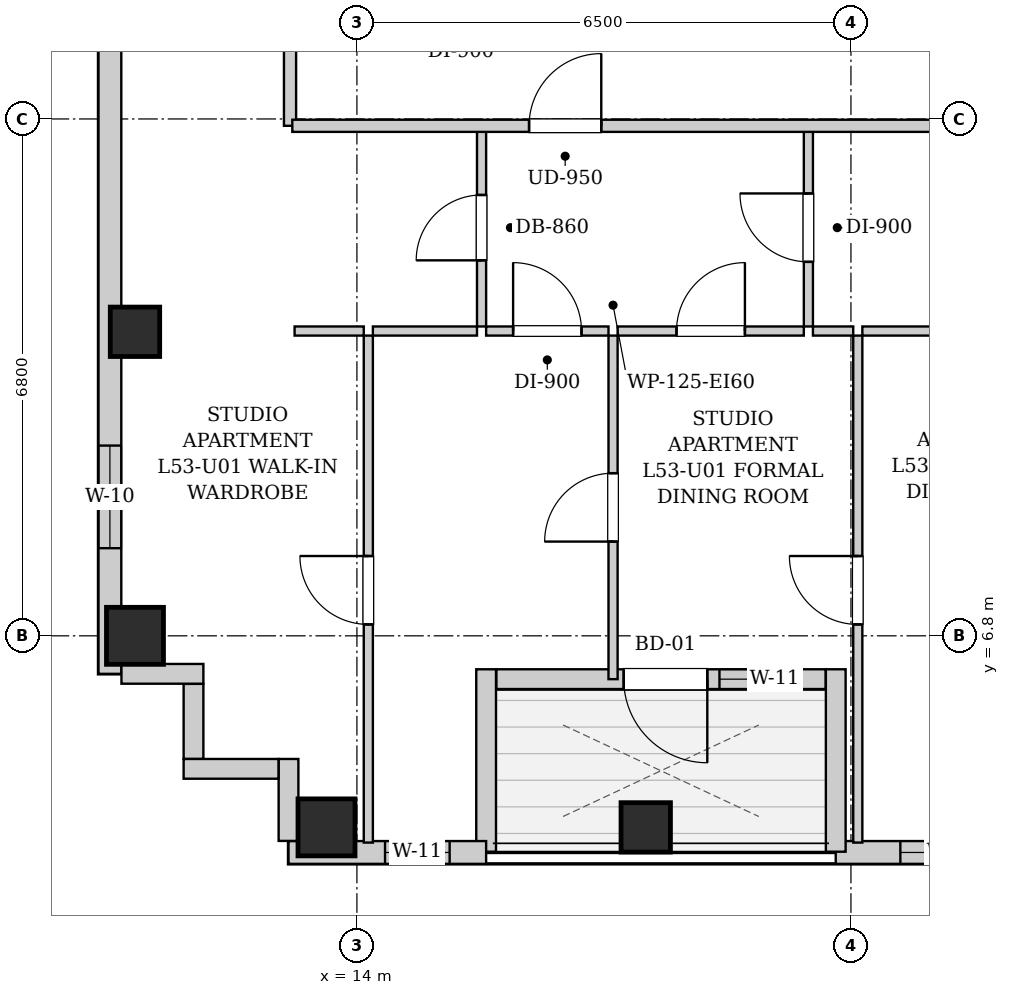
"""IFC4 building model, lengths in metres.
Left out: names, types, materials, properties, quantities, classifications, styles, units other than length and angle.
Written with IfcOpenShell. Run it as: python <this file> out.ifc"""

import sys

from ifc_helpers import new_model, si_unit, direction, frame, frame_2d, origin, origin_2d, place, context, subcontext, project, spatial, rectangle, extrude, element, fill, save


model = new_model("IFC4")
c1 = context("Model", 3, precision=1e-05, world=origin(), true_north=direction((0.0, 1.0)))
c2 = subcontext(c1, "Body", "Model", "MODEL_VIEW")
j1 = project(units=[si_unit("LENGTHUNIT", "METRE"), si_unit("PLANEANGLEUNIT", "RADIAN")], contexts=[c1])
p1 = place(None, origin())
s1 = spatial("IfcSite", under=j1, at=p1, CompositionType="ELEMENT")
p2 = place(p1, origin())
s2 = spatial("IfcBuilding", under=s1, at=p2, CompositionType="ELEMENT")
p3 = place(p2, frame((0.0, 0.0, 184.3)))
s3 = spatial("IfcBuildingStorey", under=s2, at=p3, CompositionType="ELEMENT", Elevation=184.3)
p4 = place(p3, frame((13.6, 4.28, 0.0), z_axis=(0.0, 0.0, 1.0), x_axis=(1.0, 0.0, 0.0)))
e1 = element("IfcColumn", 1, at=p4, inside=s3, PredefinedType="COLUMN", context=c2, shape_type="SweptSolid", body=[
    extrude(rectangle(XDim=0.75, YDim=0.75, at=origin_2d()), origin(), (0.0, 0.0, 1.0), 3.3),
])
p5 = place(p3, frame((17.8, 4.28, 0.0), z_axis=(0.0, 0.0, 1.0), x_axis=(1.0, 0.0, 0.0)))
e2 = element("IfcColumn", 2, at=p5, inside=s3, PredefinedType="COLUMN", context=c2, shape_type="SweptSolid", body=[
    extrude(rectangle(XDim=0.65, YDim=0.65, at=origin_2d()), origin(), (0.0, 0.0, 1.0), 3.3),
])
p6 = place(p3, frame((11.08, 6.8, 0.0), z_axis=(0.0, 0.0, 1.0), x_axis=(1.0, 0.0, 0.0)))
e3 = element("IfcColumn", 3, at=p6, inside=s3, PredefinedType="COLUMN", context=c2, shape_type="SweptSolid", body=[
    extrude(rectangle(XDim=0.75, YDim=0.75, at=origin_2d()), origin(), (0.0, 0.0, 1.0), 3.3),
])
p7 = place(p3, frame((11.08, 10.8, 0.0), z_axis=(0.0, 0.0, 1.0), x_axis=(1.0, 0.0, 0.0)))
e4 = element("IfcColumn", 4, at=p7, inside=s3, PredefinedType="COLUMN", context=c2, shape_type="SweptSolid", body=[
    extrude(rectangle(XDim=0.65, YDim=0.65, at=origin_2d()), origin(), (0.0, 0.0, 1.0), 3.3),
])
p8 = place(p3, frame((31.5, 3.95, 0.0), z_axis=(0.0, 0.0, 1.0), x_axis=(-1.0, 0.0, 0.0)))
e5 = element("IfcWall", 5, at=p8, inside=s3, PredefinedType="SOLIDWALL", context=c2, shape_type="SweptSolid", body=[
    extrude(rectangle(XDim=11.2, YDim=0.3, at=frame_2d((5.6, 0.0))), origin(), (0.0, 0.0, 1.0), 3.04),
])
p9 = place(p8, frame((9.0, 0.0, 0.55)))
e6 = element("IfcOpeningElement", 6, at=p9, cuts=e5, PredefinedType="OPENING", context=c2, shape_type="SweptSolid", body=[
    extrude(rectangle(XDim=1.35, YDim=1.2, at=frame_2d((0.675, 0.6))), frame((0.0, 0.16, 0.0), z_axis=(0.0, -1.0, 0.0), x_axis=(1.0, 0.0, 0.0)), (0.0, 0.0, 1.0), 0.32),
])
p10 = place(p8, frame((2.201, 0.0, 0.55)))
e7 = element("IfcOpeningElement", 7, at=p10, cuts=e5, PredefinedType="OPENING", context=c2, shape_type="SweptSolid", body=[
    extrude(rectangle(XDim=1.35, YDim=1.2, at=frame_2d((0.675, 0.6))), frame((0.0, 0.16, 0.0), z_axis=(0.0, -1.0, 0.0), x_axis=(1.0, 0.0, 0.0)), (0.0, 0.0, 1.0), 0.32),
])
p11 = place(p8, frame((0.35, 0.0, 0.55)))
e8 = element("IfcOpeningElement", 8, at=p11, cuts=e5, PredefinedType="OPENING", context=c2, shape_type="SweptSolid", body=[
    extrude(rectangle(XDim=0.68, YDim=1.2, at=frame_2d((0.34, 0.6))), frame((0.0, 0.16, 0.0), z_axis=(0.0, -1.0, 0.0), x_axis=(1.0, 0.0, 0.0)), (0.0, 0.0, 1.0), 0.32),
])
p12 = place(p3, frame((20.3, 3.96, 0.0), z_axis=(0.0, 0.0, 1.0), x_axis=(0.0, 1.0, 0.0)))
e9 = element("IfcWall", 9, at=p12, inside=s3, PredefinedType="SOLIDWALL", context=c2, shape_type="SweptSolid", body=[
    extrude(rectangle(XDim=2.4, YDim=0.26, at=frame_2d((1.2, 0.0))), origin(), (0.0, 0.0, 1.0), 3.04),
])
p13 = place(p3, frame((20.166, 6.23, 0.0), z_axis=(0.0, 0.0, 1.0), x_axis=(-1.0, 0.0, 0.0)))
e10 = element("IfcWall", 10, at=p13, inside=s3, PredefinedType="SOLIDWALL", context=c2, shape_type="SweptSolid", body=[
    extrude(rectangle(XDim=4.332, YDim=0.26, at=frame_2d((2.166, 0.0))), origin(), (0.0, 0.0, 1.0), 3.04),
])
p14 = place(p13, frame((1.556, 0.0, 0.0)))
e11 = element("IfcOpeningElement", 11, at=p14, cuts=e10, PredefinedType="OPENING", context=c2, shape_type="SweptSolid", body=[
    extrude(rectangle(XDim=1.1, YDim=2.0, at=frame_2d((0.55, 1.0))), frame((0.0, 0.14, 0.0), z_axis=(0.0, -1.0, 0.0), x_axis=(1.0, 0.0, 0.0)), (0.0, 0.0, 1.0), 0.28),
])
p15 = place(p13, frame((0.546, 0.0, 0.55)))
e12 = element("IfcOpeningElement", 12, at=p15, cuts=e10, PredefinedType="OPENING", context=c2, shape_type="SweptSolid", body=[
    extrude(rectangle(XDim=0.85, YDim=1.2, at=frame_2d((0.425, 0.6))), frame((0.0, 0.14, 0.0), z_axis=(0.0, -1.0, 0.0), x_axis=(1.0, 0.0, 0.0)), (0.0, 0.0, 1.0), 0.28),
])
p16 = place(p3, frame((15.7, 6.36, 0.0), z_axis=(0.0, 0.0, 1.0), x_axis=(0.0, -1.0, 0.0)))
e13 = element("IfcWall", 13, at=p16, inside=s3, PredefinedType="SOLIDWALL", context=c2, shape_type="SweptSolid", body=[
    extrude(rectangle(XDim=2.4, YDim=0.26, at=frame_2d((1.2, 0.0))), origin(), (0.0, 0.0, 1.0), 3.04),
])
p17 = place(p3, frame((15.7, 3.95, 0.0), z_axis=(0.0, 0.0, 1.0), x_axis=(-1.0, 0.0, 0.0)))
e14 = element("IfcWall", 14, at=p17, inside=s3, PredefinedType="SOLIDWALL", context=c2, shape_type="SweptSolid", body=[
    extrude(rectangle(XDim=2.6, YDim=0.3, at=frame_2d((1.3, 0.0))), origin(), (0.0, 0.0, 1.0), 3.04),
])
p18 = place(p17, frame((0.48, 0.0, 0.55)))
e15 = element("IfcOpeningElement", 15, at=p18, cuts=e14, PredefinedType="OPENING", context=c2, shape_type="SweptSolid", body=[
    extrude(rectangle(XDim=0.85, YDim=1.2, at=frame_2d((0.425, 0.6))), frame((0.0, 0.16, 0.0), z_axis=(0.0, -1.0, 0.0), x_axis=(1.0, 0.0, 0.0)), (0.0, 0.0, 1.0), 0.32),
])
p19 = place(p3, frame((10.75, 6.3, 0.0), z_axis=(0.0, 0.0, 1.0), x_axis=(0.0, 1.0, 0.0)))
e16 = element("IfcWall", 16, at=p19, inside=s3, PredefinedType="SOLIDWALL", context=c2, shape_type="SweptSolid", body=[
    extrude(rectangle(XDim=31.4, YDim=0.3, at=frame_2d((15.7, 0.0))), origin(), (0.0, 0.0, 1.0), 3.04),
])
p20 = place(p19, frame((1.653, 0.0, 0.55)))
e17 = element("IfcOpeningElement", 17, at=p20, cuts=e16, PredefinedType="OPENING", context=c2, shape_type="SweptSolid", body=[
    extrude(rectangle(XDim=1.35, YDim=1.2, at=frame_2d((0.675, 0.6))), frame((0.0, 0.16, 0.0), z_axis=(0.0, -1.0, 0.0), x_axis=(1.0, 0.0, 0.0)), (0.0, 0.0, 1.0), 0.32),
])
p21 = place(p19, frame((11.85, 0.0, 0.55)))
e18 = element("IfcOpeningElement", 18, at=p21, cuts=e16, PredefinedType="OPENING", context=c2, shape_type="SweptSolid", body=[
    extrude(rectangle(XDim=1.35, YDim=1.2, at=frame_2d((0.675, 0.6))), frame((0.0, 0.16, 0.0), z_axis=(0.0, -1.0, 0.0), x_axis=(1.0, 0.0, 0.0)), (0.0, 0.0, 1.0), 0.32),
])
p22 = place(p19, frame((9.185, 0.0, 0.55)))
e19 = element("IfcOpeningElement", 19, at=p22, cuts=e16, PredefinedType="OPENING", context=c2, shape_type="SweptSolid", body=[
    extrude(rectangle(XDim=1.35, YDim=1.2, at=frame_2d((0.675, 0.6))), frame((0.0, 0.16, 0.0), z_axis=(0.0, -1.0, 0.0), x_axis=(1.0, 0.0, 0.0)), (0.0, 0.0, 1.0), 0.32),
])
p23 = place(p19, frame((21.209, 0.0, 0.55)))
e20 = element("IfcOpeningElement", 20, at=p23, cuts=e16, PredefinedType="OPENING", context=c2, shape_type="SweptSolid", body=[
    extrude(rectangle(XDim=0.85, YDim=1.2, at=frame_2d((0.425, 0.6))), frame((0.0, 0.16, 0.0), z_axis=(0.0, -1.0, 0.0), x_axis=(1.0, 0.0, 0.0)), (0.0, 0.0, 1.0), 0.32),
])
p24 = place(p3, frame((13.1, 4.102, 0.0), z_axis=(0.0, 0.0, 1.0), x_axis=(0.0, 1.0, 0.0)))
e21 = element("IfcWall", 21, at=p24, inside=s3, PredefinedType="SOLIDWALL", context=c2, shape_type="SweptSolid", body=[
    extrude(rectangle(XDim=1.078, YDim=0.26, at=frame_2d((0.539, 0.0))), origin(), (0.0, 0.0, 1.0), 3.04),
])
p25 = place(p3, frame((12.968, 5.05, 0.0), z_axis=(0.0, 0.0, 1.0), x_axis=(-1.0, 0.0, 0.0)))
e22 = element("IfcWall", 22, at=p25, inside=s3, PredefinedType="SOLIDWALL", context=c2, shape_type="SweptSolid", body=[
    extrude(rectangle(XDim=1.248, YDim=0.26, at=frame_2d((0.624, 0.0))), origin(), (0.0, 0.0, 1.0), 3.04),
])
p26 = place(p3, frame((11.85, 5.182, 0.0), z_axis=(0.0, 0.0, 1.0), x_axis=(0.0, 1.0, 0.0)))
e23 = element("IfcWall", 23, at=p26, inside=s3, PredefinedType="SOLIDWALL", context=c2, shape_type="SweptSolid", body=[
    extrude(rectangle(XDim=0.986, YDim=0.26, at=frame_2d((0.493, 0.0))), origin(), (0.0, 0.0, 1.0), 3.04),
])
p27 = place(p3, frame((11.98, 6.3, 0.0), z_axis=(0.0, 0.0, 1.0), x_axis=(-1.0, 0.0, 0.0)))
e24 = element("IfcWall", 24, at=p27, inside=s3, PredefinedType="SOLIDWALL", context=c2, shape_type="SweptSolid", body=[
    extrude(rectangle(XDim=1.078, YDim=0.26, at=frame_2d((0.539, 0.0))), origin(), (0.0, 0.0, 1.0), 3.04),
])
p28 = place(p3, frame((13.12, 13.51, 0.0), z_axis=(0.0, 0.0, 1.0), x_axis=(0.0, 1.0, 0.0)))
e25 = element("IfcWall", 25, at=p28, inside=s3, PredefinedType="PARTITIONING", context=c2, shape_type="SweptSolid", body=[
    extrude(rectangle(XDim=1.58, YDim=0.16, at=frame_2d((0.79, 0.0))), origin(), (0.0, 0.0, 1.0), 3.04),
])
p29 = place(p3, frame((15.64, 10.87, 0.0), z_axis=(0.0, 0.0, 1.0), x_axis=(0.0, 1.0, 0.0)))
e26 = element("IfcWall", 26, at=p29, inside=s3, PredefinedType="PARTITIONING", context=c2, shape_type="SweptSolid", body=[
    extrude(rectangle(XDim=2.6, YDim=0.12, at=frame_2d((1.3, 0.0))), origin(), (0.0, 0.0, 1.0), 3.04),
])
p30 = place(p29, frame((0.87, 0.0, 0.0)))
e27 = element("IfcOpeningElement", 27, at=p30, cuts=e26, PredefinedType="OPENING", context=c2, shape_type="SweptSolid", body=[
    extrude(rectangle(XDim=0.86, YDim=2.05, at=frame_2d((0.43, 1.025))), frame((0.0, 0.07, 0.0), z_axis=(0.0, -1.0, 0.0), x_axis=(1.0, 0.0, 0.0)), (0.0, 0.0, 1.0), 0.14),
])
p31 = place(p3, frame((13.18, 10.81, 0.0), z_axis=(0.0, 0.0, 1.0), x_axis=(1.0, 0.0, 0.0)))
e28 = element("IfcWall", 28, at=p31, inside=s3, PredefinedType="PARTITIONING", context=c2, shape_type="SweptSolid", body=[
    extrude(rectangle(XDim=0.91, YDim=0.12, at=frame_2d((0.455, 0.0))), origin(), (0.0, 0.0, 1.0), 3.04),
])
p32 = place(p3, frame((14.21, 10.81, 0.0), z_axis=(0.0, 0.0, 1.0), x_axis=(1.0, 0.0, 0.0)))
e29 = element("IfcWall", 29, at=p32, inside=s3, PredefinedType="PARTITIONING", context=c2, shape_type="SweptSolid", body=[
    extrude(rectangle(XDim=1.37, YDim=0.12, at=frame_2d((0.685, 0.0))), origin(), (0.0, 0.0, 1.0), 3.04),
])
p33 = place(p3, frame((19.94, 10.87, 0.0), z_axis=(0.0, 0.0, 1.0), x_axis=(0.0, 1.0, 0.0)))
e30 = element("IfcWall", 30, at=p33, inside=s3, PredefinedType="PARTITIONING", context=c2, shape_type="SweptSolid", body=[
    extrude(rectangle(XDim=2.6, YDim=0.12, at=frame_2d((1.3, 0.0))), origin(), (0.0, 0.0, 1.0), 3.04),
])
p34 = place(p33, frame((0.85, 0.0, 0.0)))
e31 = element("IfcOpeningElement", 31, at=p34, cuts=e30, PredefinedType="OPENING", context=c2, shape_type="SweptSolid", body=[
    extrude(rectangle(XDim=0.9, YDim=2.05, at=frame_2d((0.45, 1.025))), frame((0.0, 0.07, 0.0), z_axis=(0.0, -1.0, 0.0), x_axis=(1.0, 0.0, 0.0)), (0.0, 0.0, 1.0), 0.14),
])
p35 = place(p3, frame((15.7, 10.81, 0.0), z_axis=(0.0, 0.0, 1.0), x_axis=(1.0, 0.0, 0.0)))
e32 = element("IfcWall", 32, at=p35, inside=s3, PredefinedType="PARTITIONING", context=c2, shape_type="SweptSolid", body=[
    extrude(rectangle(XDim=1.61, YDim=0.12, at=frame_2d((0.805, 0.0))), origin(), (0.0, 0.0, 1.0), 3.04),
])
p36 = place(p35, frame((0.355, 0.0, 0.0)))
e33 = element("IfcOpeningElement", 33, at=p36, cuts=e32, PredefinedType="OPENING", context=c2, shape_type="SweptSolid", body=[
    extrude(rectangle(XDim=0.9, YDim=2.05, at=frame_2d((0.45, 1.025))), frame((0.0, 0.07, 0.0), z_axis=(0.0, -1.0, 0.0), x_axis=(1.0, 0.0, 0.0)), (0.0, 0.0, 1.0), 0.14),
])
p37 = place(p3, frame((17.43, 10.81, 0.0), z_axis=(0.0, 0.0, 1.0), x_axis=(1.0, 0.0, 0.0)))
e34 = element("IfcWall", 34, at=p37, inside=s3, PredefinedType="PARTITIONING", context=c2, shape_type="SweptSolid", body=[
    extrude(rectangle(XDim=2.45, YDim=0.12, at=frame_2d((1.225, 0.0))), origin(), (0.0, 0.0, 1.0), 3.04),
])
p38 = place(p37, frame((0.775, 0.0, 0.0)))
e35 = element("IfcOpeningElement", 35, at=p38, cuts=e34, PredefinedType="OPENING", context=c2, shape_type="SweptSolid", body=[
    extrude(rectangle(XDim=0.9, YDim=2.05, at=frame_2d((0.45, 1.025))), frame((0.0, 0.07, 0.0), z_axis=(0.0, -1.0, 0.0), x_axis=(1.0, 0.0, 0.0)), (0.0, 0.0, 1.0), 0.14),
])
p39 = place(p3, frame((20.0, 10.81, 0.0), z_axis=(0.0, 0.0, 1.0), x_axis=(1.0, 0.0, 0.0)))
e36 = element("IfcWall", 36, at=p39, inside=s3, PredefinedType="PARTITIONING", context=c2, shape_type="SweptSolid", body=[
    extrude(rectangle(XDim=0.53, YDim=0.12, at=frame_2d((0.265, 0.0))), origin(), (0.0, 0.0, 1.0), 3.04),
])
p40 = place(p3, frame((20.65, 10.81, 0.0), z_axis=(0.0, 0.0, 1.0), x_axis=(1.0, 0.0, 0.0)))
e37 = element("IfcWall", 37, at=p40, inside=s3, PredefinedType="PARTITIONING", context=c2, shape_type="SweptSolid", body=[
    extrude(rectangle(XDim=2.735, YDim=0.12, at=frame_2d((1.368, 0.0))), origin(), (0.0, 0.0, 1.0), 3.04),
])
p41 = place(p40, frame((0.918, 0.0, 0.0)))
e38 = element("IfcOpeningElement", 38, at=p41, cuts=e37, PredefinedType="OPENING", context=c2, shape_type="SweptSolid", body=[
    extrude(rectangle(XDim=0.9, YDim=2.05, at=frame_2d((0.45, 1.025))), frame((0.0, 0.07, 0.0), z_axis=(0.0, -1.0, 0.0), x_axis=(1.0, 0.0, 0.0)), (0.0, 0.0, 1.0), 0.14),
])
p42 = place(p3, frame((14.15, 4.08, 0.0), z_axis=(0.0, 0.0, 1.0), x_axis=(0.0, 1.0, 0.0)))
e39 = element("IfcWall", 39, at=p42, inside=s3, PredefinedType="PARTITIONING", context=c2, shape_type="SweptSolid", body=[
    extrude(rectangle(XDim=6.67, YDim=0.12, at=frame_2d((3.335, 0.0))), origin(), (0.0, 0.0, 1.0), 3.04),
])
p43 = place(p42, frame((2.87, 0.0, 0.0)))
e40 = element("IfcOpeningElement", 40, at=p43, cuts=e39, PredefinedType="OPENING", context=c2, shape_type="SweptSolid", body=[
    extrude(rectangle(XDim=0.9, YDim=2.05, at=frame_2d((0.45, 1.025))), frame((0.0, 0.07, 0.0), z_axis=(0.0, -1.0, 0.0), x_axis=(1.0, 0.0, 0.0)), (0.0, 0.0, 1.0), 0.14),
])
p44 = place(p3, frame((17.37, 6.23, 0.0), z_axis=(0.0, 0.0, 1.0), x_axis=(0.0, 1.0, 0.0)))
e41 = element("IfcWall", 41, at=p44, inside=s3, PredefinedType="PARTITIONING", context=c2, shape_type="SweptSolid", body=[
    extrude(rectangle(XDim=4.52, YDim=0.12, at=frame_2d((2.26, 0.0))), origin(), (0.0, 0.0, 1.0), 3.04),
])
p45 = place(p44, frame((1.81, 0.0, 0.0)))
e42 = element("IfcOpeningElement", 42, at=p45, cuts=e41, PredefinedType="OPENING", context=c2, shape_type="SweptSolid", body=[
    extrude(rectangle(XDim=0.9, YDim=2.05, at=frame_2d((0.45, 1.025))), frame((0.0, 0.07, 0.0), z_axis=(0.0, -1.0, 0.0), x_axis=(1.0, 0.0, 0.0)), (0.0, 0.0, 1.0), 0.14),
])
p46 = place(p3, frame((20.59, 4.08, 0.0), z_axis=(0.0, 0.0, 1.0), x_axis=(0.0, 1.0, 0.0)))
e43 = element("IfcWall", 43, at=p46, inside=s3, PredefinedType="PARTITIONING", context=c2, shape_type="SweptSolid", body=[
    extrude(rectangle(XDim=6.67, YDim=0.12, at=frame_2d((3.335, 0.0))), origin(), (0.0, 0.0, 1.0), 3.04),
])
p47 = place(p46, frame((2.87, 0.0, 0.0)))
e44 = element("IfcOpeningElement", 44, at=p47, cuts=e43, PredefinedType="OPENING", context=c2, shape_type="SweptSolid", body=[
    extrude(rectangle(XDim=0.9, YDim=2.05, at=frame_2d((0.45, 1.025))), frame((0.0, 0.07, 0.0), z_axis=(0.0, -1.0, 0.0), x_axis=(1.0, 0.0, 0.0)), (0.0, 0.0, 1.0), 0.14),
])
p48 = place(p3, frame((13.15, 13.51, 0.0), z_axis=(0.0, 0.0, 1.0), x_axis=(1.0, 0.0, 0.0)))
e45 = element("IfcWall", 45, at=p48, inside=s3, PredefinedType="PARTITIONING", context=c2, shape_type="SweptSolid", body=[
    extrude(rectangle(XDim=24.6, YDim=0.16, at=frame_2d((12.3, 0.0))), origin(), (0.0, 0.0, 1.0), 3.04),
])
p49 = place(p48, frame((3.115, 0.0, 0.0)))
e46 = element("IfcOpeningElement", 46, at=p49, cuts=e45, PredefinedType="OPENING", context=c2, shape_type="SweptSolid", body=[
    extrude(rectangle(XDim=0.95, YDim=2.1, at=frame_2d((0.475, 1.05))), frame((0.0, 0.09, 0.0), z_axis=(0.0, -1.0, 0.0), x_axis=(1.0, 0.0, 0.0)), (0.0, 0.0, 1.0), 0.18),
])
p50 = place(p30, origin())
e47 = element("IfcDoor", 47, at=p50, inside=s3, OperationType="SINGLE_SWING_LEFT", PredefinedType="DOOR", context=c2, shape_type="SweptSolid", body=[
    extrude(rectangle(XDim=0.86, YDim=2.05, at=frame_2d((0.43, 1.025))), frame((0.0, 0.025, 0.0), z_axis=(0.0, -1.0, 0.0), x_axis=(1.0, 0.0, 0.0)), (0.0, 0.0, 1.0), 0.05),
])
fill(e27, e47)
p51 = place(p34, origin())
e48 = element("IfcDoor", 48, at=p51, inside=s3, OperationType="SINGLE_SWING_RIGHT", PredefinedType="DOOR", context=c2, shape_type="SweptSolid", body=[
    extrude(rectangle(XDim=0.9, YDim=2.05, at=frame_2d((0.45, 1.025))), frame((0.0, 0.025, 0.0), z_axis=(0.0, -1.0, 0.0), x_axis=(1.0, 0.0, 0.0)), (0.0, 0.0, 1.0), 0.05),
])
fill(e31, e48)
p52 = place(p36, origin())
e49 = element("IfcDoor", 49, at=p52, inside=s3, OperationType="SINGLE_SWING_LEFT", PredefinedType="DOOR", context=c2, shape_type="SweptSolid", body=[
    extrude(rectangle(XDim=0.9, YDim=2.05, at=frame_2d((0.45, 1.025))), frame((0.0, 0.025, 0.0), z_axis=(0.0, -1.0, 0.0), x_axis=(1.0, 0.0, 0.0)), (0.0, 0.0, 1.0), 0.05),
])
fill(e33, e49)
p53 = place(p38, origin())
e50 = element("IfcDoor", 50, at=p53, inside=s3, OperationType="SINGLE_SWING_RIGHT", PredefinedType="DOOR", context=c2, shape_type="SweptSolid", body=[
    extrude(rectangle(XDim=0.9, YDim=2.05, at=frame_2d((0.45, 1.025))), frame((0.0, 0.025, 0.0), z_axis=(0.0, -1.0, 0.0), x_axis=(1.0, 0.0, 0.0)), (0.0, 0.0, 1.0), 0.05),
])
fill(e35, e50)
p54 = place(p43, origin())
e51 = element("IfcDoor", 51, at=p54, inside=s3, OperationType="SINGLE_SWING_RIGHT", PredefinedType="DOOR", context=c2, shape_type="SweptSolid", body=[
    extrude(rectangle(XDim=0.9, YDim=2.05, at=frame_2d((0.45, 1.025))), frame((0.0, 0.025, 0.0), z_axis=(0.0, -1.0, 0.0), x_axis=(1.0, 0.0, 0.0)), (0.0, 0.0, 1.0), 0.05),
])
fill(e40, e51)
p55 = place(p45, origin())
e52 = element("IfcDoor", 52, at=p55, inside=s3, OperationType="SINGLE_SWING_LEFT", PredefinedType="DOOR", context=c2, shape_type="SweptSolid", body=[
    extrude(rectangle(XDim=0.9, YDim=2.05, at=frame_2d((0.45, 1.025))), frame((0.0, 0.025, 0.0), z_axis=(0.0, -1.0, 0.0), x_axis=(1.0, 0.0, 0.0)), (0.0, 0.0, 1.0), 0.05),
])
fill(e42, e52)
p56 = place(p47, origin())
e53 = element("IfcDoor", 53, at=p56, inside=s3, OperationType="SINGLE_SWING_RIGHT", PredefinedType="DOOR", context=c2, shape_type="SweptSolid", body=[
    extrude(rectangle(XDim=0.9, YDim=2.05, at=frame_2d((0.45, 1.025))), frame((0.0, 0.025, 0.0), z_axis=(0.0, -1.0, 0.0), x_axis=(1.0, 0.0, 0.0)), (0.0, 0.0, 1.0), 0.05),
])
fill(e44, e53)
p57 = place(p49, origin())
e54 = element("IfcDoor", 54, at=p57, inside=s3, OperationType="SINGLE_SWING_RIGHT", PredefinedType="DOOR", context=c2, shape_type="SweptSolid", body=[
    extrude(rectangle(XDim=0.95, YDim=2.1, at=frame_2d((0.475, 1.05))), frame((0.0, 0.025, 0.0), z_axis=(0.0, -1.0, 0.0), x_axis=(1.0, 0.0, 0.0)), (0.0, 0.0, 1.0), 0.05),
])
fill(e46, e54)
p58 = place(p14, origin())
e55 = element("IfcDoor", 55, at=p58, inside=s3, OperationType="SINGLE_SWING_LEFT", PredefinedType="DOOR", context=c2, shape_type="SweptSolid", body=[
    extrude(rectangle(XDim=1.1, YDim=2.0, at=frame_2d((0.55, 1.0))), frame((0.0, 0.025, 0.0), z_axis=(0.0, -1.0, 0.0), x_axis=(1.0, 0.0, 0.0)), (0.0, 0.0, 1.0), 0.05),
])
fill(e11, e55)
p59 = place(p20, origin())
e56 = element("IfcWindow", 56, at=p59, inside=s3, PartitioningType="SINGLE_PANEL", PredefinedType="WINDOW", context=c2, shape_type="SweptSolid", body=[
    extrude(rectangle(XDim=1.35, YDim=1.2, at=frame_2d((0.675, 0.6))), frame((0.0, 0.03, 0.0), z_axis=(0.0, -1.0, 0.0), x_axis=(1.0, 0.0, 0.0)), (0.0, 0.0, 1.0), 0.06),
])
fill(e17, e56)
p60 = place(p18, origin())
e57 = element("IfcWindow", 57, at=p60, inside=s3, PartitioningType="SINGLE_PANEL", PredefinedType="WINDOW", context=c2, shape_type="SweptSolid", body=[
    extrude(rectangle(XDim=0.85, YDim=1.2, at=frame_2d((0.425, 0.6))), frame((0.0, 0.03, 0.0), z_axis=(0.0, -1.0, 0.0), x_axis=(1.0, 0.0, 0.0)), (0.0, 0.0, 1.0), 0.06),
])
fill(e15, e57)
p61 = place(p15, origin())
e58 = element("IfcWindow", 58, at=p61, inside=s3, PartitioningType="SINGLE_PANEL", PredefinedType="WINDOW", context=c2, shape_type="SweptSolid", body=[
    extrude(rectangle(XDim=0.85, YDim=1.2, at=frame_2d((0.425, 0.6))), frame((0.0, 0.03, 0.0), z_axis=(0.0, -1.0, 0.0), x_axis=(1.0, 0.0, 0.0)), (0.0, 0.0, 1.0), 0.06),
])
fill(e12, e58)
p62 = place(p9, origin())
e59 = element("IfcWindow", 59, at=p62, inside=s3, PartitioningType="SINGLE_PANEL", PredefinedType="WINDOW", context=c2, shape_type="SweptSolid", body=[
    extrude(rectangle(XDim=1.35, YDim=1.2, at=frame_2d((0.675, 0.6))), frame((0.0, 0.03, 0.0), z_axis=(0.0, -1.0, 0.0), x_axis=(1.0, 0.0, 0.0)), (0.0, 0.0, 1.0), 0.06),
])
fill(e6, e59)
save(model, sys.argv[1])
